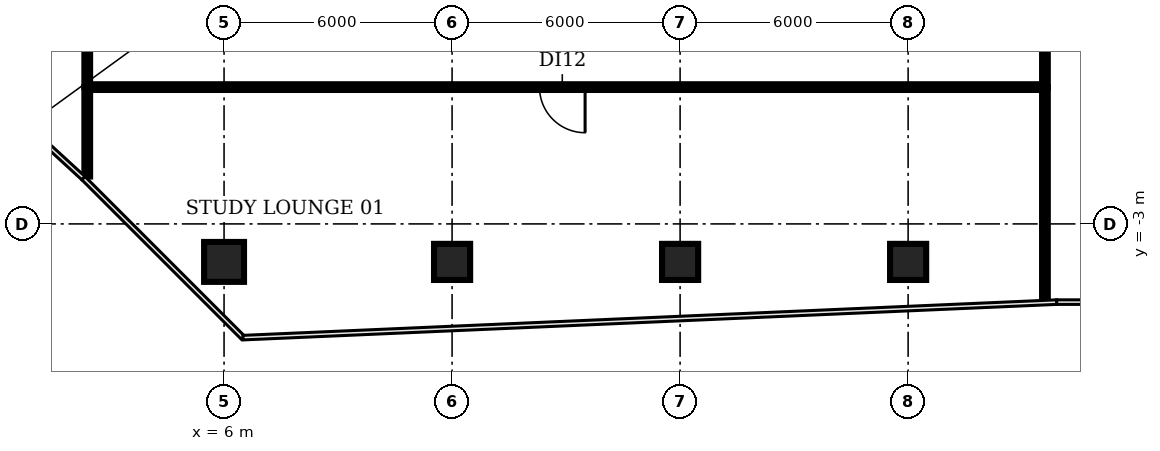
"""IFC4 building model, lengths in metres.
Left out: names, types, materials, properties, quantities, classifications, styles, units other than length and angle.
Written with IfcOpenShell. Run it as: python <this file> out.ifc"""

import sys

from ifc_helpers import new_model, si_unit, direction, frame, frame_2d, origin, origin_2d, place, context, subcontext, project, spatial, rectangle, circle, extrude, element, fill, save


model = new_model("IFC4")
c1 = context("Model", 3, precision=1e-05, world=origin(), true_north=direction((0.0, 1.0)))
c2 = subcontext(c1, "Body", "Model", "MODEL_VIEW")
j1 = project(units=[si_unit("LENGTHUNIT", "METRE"), si_unit("PLANEANGLEUNIT", "RADIAN")], contexts=[c1])
p1 = place(None, origin())
s1 = spatial("IfcSite", under=j1, at=p1, CompositionType="ELEMENT")
p2 = place(p1, origin())
s2 = spatial("IfcBuilding", under=s1, at=p2, CompositionType="ELEMENT")
p3 = place(p2, frame((0.0, 0.0, 62.6)))
s3 = spatial("IfcBuildingStorey", under=s2, at=p3, CompositionType="ELEMENT", Elevation=62.6)
p4 = place(p3, frame((6.0, -4.0, 0.0), z_axis=(0.0, 0.0, 1.0), x_axis=(1.0, 0.0, 0.0)))
e1 = element("IfcColumn", 1, at=p4, inside=s3, PredefinedType="COLUMN", context=c2, shape_type="SweptSolid", body=[
    extrude(circle(Radius=0.525, at=origin_2d()), origin(), (0.0, 0.0, 1.0), 3.85),
])
for number, where, z_axis, x_axis in (
    (2, (12.0, -4.0, 0.0), (0.0, 0.0, 1.0), (1.0, 0.0, 0.0)),
    (3, (18.0, -4.0, 0.0), (0.0, 0.0, 1.0), (1.0, 0.0, 0.0)),
    (4, (24.0, -4.0, 0.0), (0.0, 0.0, 1.0), (1.0, 0.0, 0.0)),
):
    element("IfcColumn", number, at=place(p3, frame(where, z_axis=z_axis, x_axis=x_axis)), inside=s3, PredefinedType="COLUMN", context=c2, shape_type="SweptSolid", body=[
        extrude(rectangle(XDim=0.95, YDim=0.95, at=origin_2d()), origin(), (0.0, 0.0, 1.0), 3.85),
    ])
p5 = place(p3, frame((2.4, -1.753, 0.0), z_axis=(0.0, 0.0, 1.0), x_axis=(0.0, 1.0, 0.0)))
e5 = element("IfcWall", 5, at=p5, inside=s3, PredefinedType="PARTITIONING", context=c2, shape_type="SweptSolid", body=[
    extrude(rectangle(XDim=2.353, YDim=0.15, at=frame_2d((1.177, 0.0))), origin(), (0.0, 0.0, 1.0), 2.83),
])
p6 = place(p3, frame((2.4, 0.6, 0.0), z_axis=(0.0, 0.0, 1.0), x_axis=(0.0, 1.0, 0.0)))
e6 = element("IfcWall", 6, at=p6, inside=s3, PredefinedType="PARTITIONING", context=c2, shape_type="SweptSolid", body=[
    extrude(rectangle(XDim=3.9, YDim=0.15, at=frame_2d((1.95, 0.0))), origin(), (0.0, 0.0, 1.0), 2.83),
])
p7 = place(p3, frame((27.6, -5.02, 0.0), z_axis=(0.0, 0.0, 1.0), x_axis=(0.0, 1.0, 0.0)))
e7 = element("IfcWall", 7, at=p7, inside=s3, PredefinedType="PARTITIONING", context=c2, shape_type="SweptSolid", body=[
    extrude(rectangle(XDim=5.62, YDim=0.15, at=frame_2d((2.81, 0.0))), origin(), (0.0, 0.0, 1.0), 2.83),
])
p8 = place(p3, frame((27.6, 0.6, 0.0), z_axis=(0.0, 0.0, 1.0), x_axis=(-1.0, 0.0, 0.0)))
e8 = element("IfcWall", 8, at=p8, inside=s3, PredefinedType="PARTITIONING", context=c2, shape_type="SweptSolid", body=[
    extrude(rectangle(XDim=25.2, YDim=0.15, at=frame_2d((12.6, 0.0))), origin(), (0.0, 0.0, 1.0), 2.83),
])
p9 = place(p8, frame((12.1, 0.0, 0.0)))
e9 = element("IfcOpeningElement", 9, at=p9, cuts=e8, PredefinedType="OPENING", context=c2, shape_type="SweptSolid", body=[
    extrude(rectangle(XDim=1.2, YDim=2.1, at=frame_2d((0.6, 1.05))), frame((0.0, 0.085, 0.0), z_axis=(0.0, -1.0, 0.0), x_axis=(1.0, 0.0, 0.0)), (0.0, 0.0, 1.0), 0.17),
])
p10 = place(p3, frame((27.6, 0.6, 0.0), z_axis=(0.0, 0.0, 1.0), x_axis=(0.0, 1.0, 0.0)))
e10 = element("IfcWall", 10, at=p10, inside=s3, PredefinedType="PARTITIONING", context=c2, shape_type="SweptSolid", body=[
    extrude(rectangle(XDim=3.9, YDim=0.15, at=frame_2d((1.95, 0.0))), origin(), (0.0, 0.0, 1.0), 2.83),
])
p11 = place(p9, origin())
e11 = element("IfcDoor", 11, at=p11, inside=s3, OperationType="SINGLE_SWING_LEFT", PredefinedType="DOOR", context=c2, shape_type="SweptSolid", body=[
    extrude(rectangle(XDim=1.2, YDim=2.1, at=frame_2d((0.6, 1.05))), frame((0.0, 0.025, 0.0), z_axis=(0.0, -1.0, 0.0), x_axis=(1.0, 0.0, 0.0)), (0.0, 0.0, 1.0), 0.05),
])
fill(e9, e11)
save(model, sys.argv[1])
